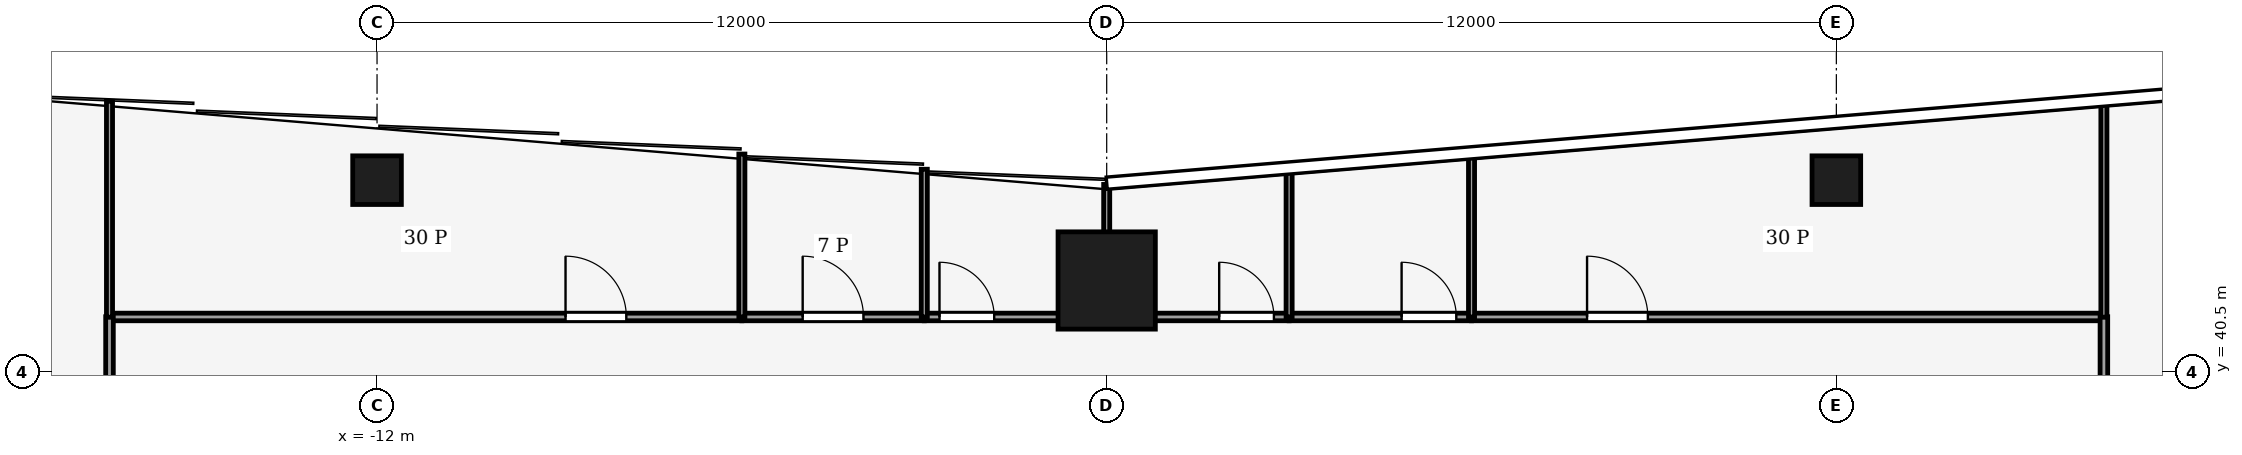
"""IFC4 building model, lengths in metres.
Left out: names, types, materials, properties, quantities, classifications, styles, units other than length and angle.
Written with IfcOpenShell. Run it as: python <this file> out.ifc"""

import sys

from ifc_helpers import new_model, si_unit, direction, frame, frame_2d, origin, origin_2d, place, context, subcontext, project, spatial, rectangle, hollow_rectangle, extrude, element, fill, save


model = new_model("IFC4")
c1 = context("Model", 3, precision=1e-05, world=origin(), true_north=direction((0.0, 1.0)))
c2 = subcontext(c1, "Body", "Model", "MODEL_VIEW")
j1 = project(units=[si_unit("LENGTHUNIT", "METRE"), si_unit("PLANEANGLEUNIT", "RADIAN")], contexts=[c1])
p1 = place(None, origin())
s1 = spatial("IfcSite", under=j1, at=p1, CompositionType="ELEMENT")
p2 = place(p1, origin())
s2 = spatial("IfcBuilding", under=s1, at=p2, CompositionType="ELEMENT")
p3 = place(p2, frame((0.0, 0.0, 34.0)))
s3 = spatial("IfcBuildingStorey", under=s2, at=p3, CompositionType="ELEMENT", Elevation=34.0)
p4 = place(p3, frame((0.0, 42.0, 0.0), z_axis=(0.0, 0.0, 1.0), x_axis=(1.0, 0.0, 0.0)))
e1 = element("IfcColumn", 1, at=p4, inside=s3, PredefinedType="COLUMN", context=c2, shape_type="SweptSolid", body=[
    extrude(hollow_rectangle(XDim=1.6, YDim=1.6, WallThickness=0.09, at=origin_2d()), origin(), (0.0, 0.0, 1.0), 4.0),
])
for number, where, z_axis, x_axis in (
    (2, (-12.0, 43.65, 0.0), (0.0, 0.0, 1.0), (1.0, 0.0, 0.0)),
    (3, (12.0, 43.65, 0.0), (0.0, 0.0, 1.0), (1.0, 0.0, 0.0)),
):
    element("IfcColumn", number, at=place(p3, frame(where, z_axis=z_axis, x_axis=x_axis)), inside=s3, PredefinedType="COLUMN", context=c2, shape_type="SweptSolid", body=[
        extrude(hollow_rectangle(XDim=0.8, YDim=0.8, WallThickness=0.04, at=origin_2d()), origin(), (0.0, 0.0, 1.0), 4.0),
    ])
p5 = place(p3, frame((-16.4, 41.4, 0.0), z_axis=(0.0, 0.0, 1.0), x_axis=(1.0, 0.0, 0.0)))
e4 = element("IfcWall", 4, at=p5, inside=s3, PredefinedType="PARTITIONING", context=c2, shape_type="SweptSolid", body=[
    extrude(rectangle(XDim=10.4, YDim=0.125, at=frame_2d((5.2, 0.0))), origin(), (0.0, 0.0, 1.0), 3.54),
])
p6 = place(p5, frame((7.5, 0.0, 0.0)))
e5 = element("IfcOpeningElement", 5, at=p6, cuts=e4, PredefinedType="OPENING", context=c2, shape_type="SweptSolid", body=[
    extrude(rectangle(XDim=1.0, YDim=2.1, at=frame_2d((0.5, 1.05))), frame((0.0, 0.073, 0.0), z_axis=(0.0, -1.0, 0.0), x_axis=(1.0, 0.0, 0.0)), (0.0, 0.0, 1.0), 0.145),
])
p7 = place(p3, frame((-6.0, 41.4, 0.0), z_axis=(0.0, 0.0, 1.0), x_axis=(1.0, 0.0, 0.0)))
e6 = element("IfcWall", 6, at=p7, inside=s3, PredefinedType="PARTITIONING", context=c2, shape_type="SweptSolid", body=[
    extrude(rectangle(XDim=3.0, YDim=0.125, at=frame_2d((1.5, 0.0))), origin(), (0.0, 0.0, 1.0), 3.54),
])
p8 = place(p7, frame((1.0, 0.0, 0.0)))
e7 = element("IfcOpeningElement", 7, at=p8, cuts=e6, PredefinedType="OPENING", context=c2, shape_type="SweptSolid", body=[
    extrude(rectangle(XDim=1.0, YDim=2.1, at=frame_2d((0.5, 1.05))), frame((0.0, 0.073, 0.0), z_axis=(0.0, -1.0, 0.0), x_axis=(1.0, 0.0, 0.0)), (0.0, 0.0, 1.0), 0.145),
])
p9 = place(p3, frame((-3.0, 41.4, 0.0), z_axis=(0.0, 0.0, 1.0), x_axis=(1.0, 0.0, 0.0)))
e8 = element("IfcWall", 8, at=p9, inside=s3, PredefinedType="PARTITIONING", context=c2, shape_type="SweptSolid", body=[
    extrude(rectangle(XDim=3.0, YDim=0.125, at=frame_2d((1.5, 0.0))), origin(), (0.0, 0.0, 1.0), 3.87),
])
p10 = place(p9, frame((0.25, 0.0, 0.0)))
e9 = element("IfcOpeningElement", 9, at=p10, cuts=e8, PredefinedType="OPENING", context=c2, shape_type="SweptSolid", body=[
    extrude(rectangle(XDim=0.9, YDim=2.1, at=frame_2d((0.45, 1.05))), frame((0.0, 0.073, 0.0), z_axis=(0.0, -1.0, 0.0), x_axis=(1.0, 0.0, 0.0)), (0.0, 0.0, 1.0), 0.145),
])
p11 = place(p3, frame((0.0, 41.4, 0.0), z_axis=(0.0, 0.0, 1.0), x_axis=(1.0, 0.0, 0.0)))
e10 = element("IfcWall", 10, at=p11, inside=s3, PredefinedType="PARTITIONING", context=c2, shape_type="SweptSolid", body=[
    extrude(rectangle(XDim=3.0, YDim=0.125, at=frame_2d((1.5, 0.0))), origin(), (0.0, 0.0, 1.0), 3.87),
])
p12 = place(p11, frame((1.85, 0.0, 0.0)))
e11 = element("IfcOpeningElement", 11, at=p12, cuts=e10, PredefinedType="OPENING", context=c2, shape_type="SweptSolid", body=[
    extrude(rectangle(XDim=0.9, YDim=2.1, at=frame_2d((0.45, 1.05))), frame((0.0, 0.073, 0.0), z_axis=(0.0, -1.0, 0.0), x_axis=(1.0, 0.0, 0.0)), (0.0, 0.0, 1.0), 0.145),
])
p13 = place(p3, frame((3.0, 41.4, 0.0), z_axis=(0.0, 0.0, 1.0), x_axis=(1.0, 0.0, 0.0)))
e12 = element("IfcWall", 12, at=p13, inside=s3, PredefinedType="PARTITIONING", context=c2, shape_type="SweptSolid", body=[
    extrude(rectangle(XDim=3.0, YDim=0.125, at=frame_2d((1.5, 0.0))), origin(), (0.0, 0.0, 1.0), 3.54),
])
p14 = place(p13, frame((1.85, 0.0, 0.0)))
e13 = element("IfcOpeningElement", 13, at=p14, cuts=e12, PredefinedType="OPENING", context=c2, shape_type="SweptSolid", body=[
    extrude(rectangle(XDim=0.9, YDim=2.1, at=frame_2d((0.45, 1.05))), frame((0.0, 0.073, 0.0), z_axis=(0.0, -1.0, 0.0), x_axis=(1.0, 0.0, 0.0)), (0.0, 0.0, 1.0), 0.145),
])
p15 = place(p3, frame((6.0, 41.4, 0.0), z_axis=(0.0, 0.0, 1.0), x_axis=(1.0, 0.0, 0.0)))
e14 = element("IfcWall", 14, at=p15, inside=s3, PredefinedType="PARTITIONING", context=c2, shape_type="SweptSolid", body=[
    extrude(rectangle(XDim=10.4, YDim=0.125, at=frame_2d((5.2, 0.0))), origin(), (0.0, 0.0, 1.0), 3.54),
])
p16 = place(p15, frame((1.9, 0.0, 0.0)))
e15 = element("IfcOpeningElement", 15, at=p16, cuts=e14, PredefinedType="OPENING", context=c2, shape_type="SweptSolid", body=[
    extrude(rectangle(XDim=1.0, YDim=2.1, at=frame_2d((0.5, 1.05))), frame((0.0, 0.073, 0.0), z_axis=(0.0, -1.0, 0.0), x_axis=(1.0, 0.0, 0.0)), (0.0, 0.0, 1.0), 0.145),
])
p17 = place(p3, frame((-16.4, 36.0, 0.0), z_axis=(0.0, 0.0, 1.0), x_axis=(0.0, 1.0, 0.0)))
e16 = element("IfcWall", 16, at=p17, inside=s3, PredefinedType="PARTITIONING", context=c2, shape_type="SweptSolid", body=[
    extrude(rectangle(XDim=5.404, YDim=0.125, at=frame_2d((2.702, 0.0))), origin(), (0.0, 0.0, 1.0), 3.14),
])
p18 = place(p17, frame((2.202, 0.0, 0.0)))
e17 = element("IfcOpeningElement", 17, at=p18, cuts=e16, PredefinedType="OPENING", context=c2, shape_type="SweptSolid", body=[
    extrude(rectangle(XDim=1.0, YDim=2.1, at=frame_2d((0.5, 1.05))), frame((0.0, 0.073, 0.0), z_axis=(0.0, -1.0, 0.0), x_axis=(1.0, 0.0, 0.0)), (0.0, 0.0, 1.0), 0.145),
])
p19 = place(p3, frame((16.4, 41.404, 0.0), z_axis=(0.0, 0.0, 1.0), x_axis=(0.0, -1.0, 0.0)))
e18 = element("IfcWall", 18, at=p19, inside=s3, PredefinedType="PARTITIONING", context=c2, shape_type="SweptSolid", body=[
    extrude(rectangle(XDim=5.404, YDim=0.125, at=frame_2d((2.702, 0.0))), origin(), (0.0, 0.0, 1.0), 3.14),
])
p20 = place(p19, frame((2.202, 0.0, 0.0)))
e19 = element("IfcOpeningElement", 19, at=p20, cuts=e18, PredefinedType="OPENING", context=c2, shape_type="SweptSolid", body=[
    extrude(rectangle(XDim=1.0, YDim=2.1, at=frame_2d((0.5, 1.05))), frame((0.0, 0.073, 0.0), z_axis=(0.0, -1.0, 0.0), x_axis=(1.0, 0.0, 0.0)), (0.0, 0.0, 1.0), 0.145),
])
p21 = place(p3, frame((-6.0, 41.4, 0.0), z_axis=(0.0, 0.0, 1.0), x_axis=(0.0, 1.0, 0.0)))
e20 = element("IfcWall", 20, at=p21, inside=s3, PredefinedType="PARTITIONING", context=c2, shape_type="SweptSolid", body=[
    extrude(rectangle(XDim=2.68, YDim=0.1, at=frame_2d((1.34, 0.0))), origin(), (0.0, 0.0, 1.0), 3.04),
])
p22 = place(p3, frame((-16.4, 44.947, 0.0), z_axis=(0.0, 0.0, 1.0), x_axis=(0.0, -1.0, 0.0)))
e21 = element("IfcWall", 21, at=p22, inside=s3, PredefinedType="PARTITIONING", context=c2, shape_type="SweptSolid", body=[
    extrude(rectangle(XDim=3.551, YDim=0.1, at=frame_2d((1.775, 0.0))), origin(), (0.0, 0.0, 1.0), 3.04),
])
p23 = place(p3, frame((-3.0, 41.4, 0.0), z_axis=(0.0, 0.0, 1.0), x_axis=(0.0, 1.0, 0.0)))
e22 = element("IfcWall", 22, at=p23, inside=s3, PredefinedType="PARTITIONING", context=c2, shape_type="SweptSolid", body=[
    extrude(rectangle(XDim=2.43, YDim=0.1, at=frame_2d((1.215, 0.0))), origin(), (0.0, 0.0, 1.0), 3.04),
])
p24 = place(p3, frame((0.0, 41.4, 0.0), z_axis=(0.0, 0.0, 1.0), x_axis=(0.0, 1.0, 0.0)))
e23 = element("IfcWall", 23, at=p24, inside=s3, PredefinedType="PARTITIONING", context=c2, shape_type="SweptSolid", body=[
    extrude(rectangle(XDim=2.18, YDim=0.1, at=frame_2d((1.09, 0.0))), origin(), (0.0, 0.0, 1.0), 3.04),
])
p25 = place(p3, frame((3.0, 41.4, 0.0), z_axis=(0.0, 0.0, 1.0), x_axis=(0.0, 1.0, 0.0)))
e24 = element("IfcWall", 24, at=p25, inside=s3, PredefinedType="PARTITIONING", context=c2, shape_type="SweptSolid", body=[
    extrude(rectangle(XDim=2.43, YDim=0.1, at=frame_2d((1.215, 0.0))), origin(), (0.0, 0.0, 1.0), 3.04),
])
p26 = place(p3, frame((6.0, 41.4, 0.0), z_axis=(0.0, 0.0, 1.0), x_axis=(0.0, 1.0, 0.0)))
e25 = element("IfcWall", 25, at=p26, inside=s3, PredefinedType="PARTITIONING", context=c2, shape_type="SweptSolid", body=[
    extrude(rectangle(XDim=2.68, YDim=0.1, at=frame_2d((1.34, 0.0))), origin(), (0.0, 0.0, 1.0), 3.04),
])
p27 = place(p3, frame((16.4, 41.396, 0.0), z_axis=(0.0, 0.0, 1.0), x_axis=(0.0, 1.0, 0.0)))
e26 = element("IfcWall", 26, at=p27, inside=s3, PredefinedType="PARTITIONING", context=c2, shape_type="SweptSolid", body=[
    extrude(rectangle(XDim=3.551, YDim=0.1, at=frame_2d((1.775, 0.0))), origin(), (0.0, 0.0, 1.0), 3.04),
])
p28 = place(p6, origin())
e27 = element("IfcDoor", 27, at=p28, inside=s3, OperationType="SINGLE_SWING_RIGHT", PredefinedType="DOOR", context=c2, shape_type="SweptSolid", body=[
    extrude(rectangle(XDim=1.0, YDim=2.1, at=frame_2d((0.5, 1.05))), frame((0.0, 0.025, 0.0), z_axis=(0.0, -1.0, 0.0), x_axis=(1.0, 0.0, 0.0)), (0.0, 0.0, 1.0), 0.05),
])
fill(e5, e27)
p29 = place(p8, origin())
e28 = element("IfcDoor", 28, at=p29, inside=s3, OperationType="SINGLE_SWING_LEFT", PredefinedType="DOOR", context=c2, shape_type="SweptSolid", body=[
    extrude(rectangle(XDim=1.0, YDim=2.1, at=frame_2d((0.5, 1.05))), frame((0.0, 0.025, 0.0), z_axis=(0.0, -1.0, 0.0), x_axis=(1.0, 0.0, 0.0)), (0.0, 0.0, 1.0), 0.05),
])
fill(e7, e28)
p30 = place(p10, origin())
e29 = element("IfcDoor", 29, at=p30, inside=s3, OperationType="SINGLE_SWING_LEFT", PredefinedType="DOOR", context=c2, shape_type="SweptSolid", body=[
    extrude(rectangle(XDim=0.9, YDim=2.1, at=frame_2d((0.45, 1.05))), frame((0.0, 0.025, 0.0), z_axis=(0.0, -1.0, 0.0), x_axis=(1.0, 0.0, 0.0)), (0.0, 0.0, 1.0), 0.05),
])
fill(e9, e29)
p31 = place(p12, origin())
e30 = element("IfcDoor", 30, at=p31, inside=s3, OperationType="SINGLE_SWING_RIGHT", PredefinedType="DOOR", context=c2, shape_type="SweptSolid", body=[
    extrude(rectangle(XDim=0.9, YDim=2.1, at=frame_2d((0.45, 1.05))), frame((0.0, 0.025, 0.0), z_axis=(0.0, -1.0, 0.0), x_axis=(1.0, 0.0, 0.0)), (0.0, 0.0, 1.0), 0.05),
])
fill(e11, e30)
p32 = place(p14, origin())
e31 = element("IfcDoor", 31, at=p32, inside=s3, OperationType="SINGLE_SWING_RIGHT", PredefinedType="DOOR", context=c2, shape_type="SweptSolid", body=[
    extrude(rectangle(XDim=0.9, YDim=2.1, at=frame_2d((0.45, 1.05))), frame((0.0, 0.025, 0.0), z_axis=(0.0, -1.0, 0.0), x_axis=(1.0, 0.0, 0.0)), (0.0, 0.0, 1.0), 0.05),
])
fill(e13, e31)
p33 = place(p16, origin())
e32 = element("IfcDoor", 32, at=p33, inside=s3, OperationType="SINGLE_SWING_LEFT", PredefinedType="DOOR", context=c2, shape_type="SweptSolid", body=[
    extrude(rectangle(XDim=1.0, YDim=2.1, at=frame_2d((0.5, 1.05))), frame((0.0, 0.025, 0.0), z_axis=(0.0, -1.0, 0.0), x_axis=(1.0, 0.0, 0.0)), (0.0, 0.0, 1.0), 0.05),
])
fill(e15, e32)
save(model, sys.argv[1])
